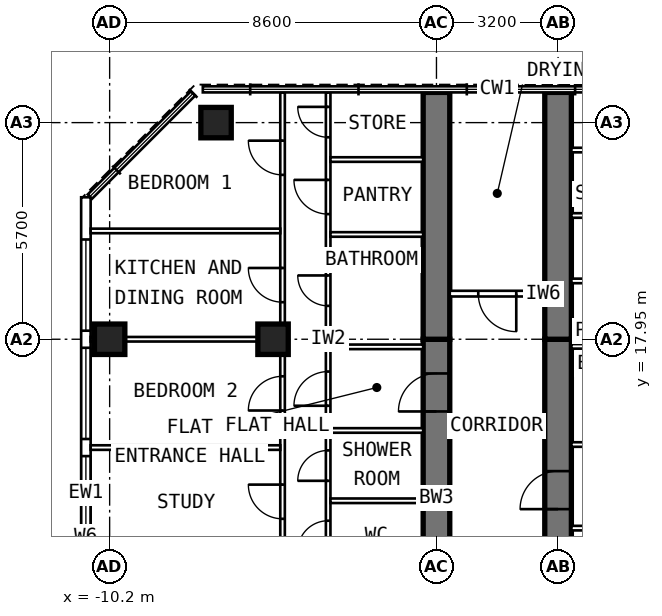
"""IFC4 building model, lengths in metres.
Left out: names, types, materials, properties, quantities, classifications, styles, units other than length and angle.
Written with IfcOpenShell. Run it as: python <this file> out.ifc"""

import sys

from ifc_helpers import new_model, si_unit, direction, frame, frame_2d, origin, origin_2d, place, context, subcontext, project, spatial, rectangle, extrude, element, fill, save


model = new_model("IFC4")
c1 = context("Model", 3, precision=1e-05, world=origin(), true_north=direction((0.0, 1.0)))
c2 = subcontext(c1, "Body", "Model", "MODEL_VIEW")
j1 = project(units=[si_unit("LENGTHUNIT", "METRE"), si_unit("PLANEANGLEUNIT", "RADIAN")], contexts=[c1])
p1 = place(None, origin())
s1 = spatial("IfcSite", under=j1, at=p1, CompositionType="ELEMENT")
p2 = place(p1, origin())
s2 = spatial("IfcBuilding", under=s1, at=p2, CompositionType="ELEMENT")
p3 = place(p2, frame((0.0, 0.0, 267.4)))
s3 = spatial("IfcBuildingStorey", under=s2, at=p3, CompositionType="ELEMENT", Elevation=267.4)
for number, where, z_axis, x_axis in (
    (1, (-10.2, 17.95, 0.0), (0.0, 0.0, 1.0), (0.0, 1.0, 0.0)),
    (2, (-7.4, 23.65, 0.0), (0.0, 0.0, 1.0), (0.0, 1.0, 0.0)),
    (3, (-5.9, 17.95, 0.0), (0.0, 0.0, 1.0), (0.0, 1.0, 0.0)),
):
    element("IfcColumn", number, at=place(p3, frame(where, z_axis=z_axis, x_axis=x_axis)), inside=s3, PredefinedType="COLUMN", context=c2, shape_type="SweptSolid", body=[
        extrude(rectangle(XDim=0.8, YDim=0.8, at=origin_2d()), origin(), (0.0, 0.0, 1.0), 3.6),
    ])
p4 = place(p3, frame((-1.6, 9.6, 0.0), z_axis=(0.0, 0.0, 1.0), x_axis=(0.0, 1.0, 0.0)))
e4 = element("IfcWall", 4, at=p4, inside=s3, PredefinedType="SHEAR", context=c2, shape_type="SweptSolid", body=[
    extrude(rectangle(XDim=8.35, YDim=0.7, at=frame_2d((4.175, 0.0))), origin(), (0.0, 0.0, 1.0), 3.6),
])
p5 = place(p4, frame((6.45, 0.0, 0.0)))
e5 = element("IfcOpeningElement", 5, at=p5, cuts=e4, PredefinedType="OPENING", context=c2, shape_type="SweptSolid", body=[
    extrude(rectangle(XDim=1.0, YDim=2.1, at=frame_2d((0.5, 1.05))), frame((0.0, 0.362, 0.0), z_axis=(0.0, -1.0, 0.0), x_axis=(1.0, 0.0, 0.0)), (0.0, 0.0, 1.0), 0.724),
])
p6 = place(p3, frame((-1.6, 17.95, 0.0), z_axis=(0.0, 0.0, 1.0), x_axis=(0.0, 1.0, 0.0)))
e6 = element("IfcWall", 6, at=p6, inside=s3, PredefinedType="SHEAR", context=c2, shape_type="SweptSolid", body=[
    extrude(rectangle(XDim=6.495, YDim=0.7, at=frame_2d((3.248, 0.0))), origin(), (0.0, 0.0, 1.0), 3.6),
])
p7 = place(p3, frame((1.6, 9.6, 0.0), z_axis=(0.0, 0.0, 1.0), x_axis=(0.0, 1.0, 0.0)))
e7 = element("IfcWall", 7, at=p7, inside=s3, PredefinedType="SHEAR", context=c2, shape_type="SweptSolid", body=[
    extrude(rectangle(XDim=8.35, YDim=0.7, at=frame_2d((4.175, 0.0))), origin(), (0.0, 0.0, 1.0), 3.6),
])
p8 = place(p7, frame((3.88, 0.0, 0.0)))
e8 = element("IfcOpeningElement", 8, at=p8, cuts=e7, PredefinedType="OPENING", context=c2, shape_type="SweptSolid", body=[
    extrude(rectangle(XDim=1.0, YDim=2.1, at=frame_2d((0.5, 1.05))), frame((0.0, 0.362, 0.0), z_axis=(0.0, -1.0, 0.0), x_axis=(1.0, 0.0, 0.0)), (0.0, 0.0, 1.0), 0.724),
])
p9 = place(p3, frame((1.6, 17.95, 0.0), z_axis=(0.0, 0.0, 1.0), x_axis=(0.0, 1.0, 0.0)))
e9 = element("IfcWall", 9, at=p9, inside=s3, PredefinedType="SHEAR", context=c2, shape_type="SweptSolid", body=[
    extrude(rectangle(XDim=6.495, YDim=0.7, at=frame_2d((3.248, 0.0))), origin(), (0.0, 0.0, 1.0), 3.6),
])
p10 = place(p3, frame((-10.825, 6.148, 0.0), z_axis=(0.0, 0.0, 1.0), x_axis=(0.0, 1.0, 0.0)))
e10 = element("IfcWall", 10, at=p10, inside=s3, PredefinedType="SOLIDWALL", context=c2, shape_type="SweptSolid", body=[
    extrude(rectangle(XDim=15.537, YDim=0.25, at=frame_2d((7.769, 0.0))), origin(), (0.0, 0.0, 1.0), 3.35),
])
p11 = place(p10, frame((0.627, 0.0, 0.6)))
e11 = element("IfcOpeningElement", 11, at=p11, cuts=e10, PredefinedType="OPENING", context=c2, shape_type="SweptSolid", body=[
    extrude(rectangle(XDim=2.4, YDim=2.0, at=frame_2d((1.2, 1.0))), frame((0.0, 0.137, 0.0), z_axis=(0.0, -1.0, 0.0), x_axis=(1.0, 0.0, 0.0)), (0.0, 0.0, 1.0), 0.274),
])
p12 = place(p10, frame((3.477, 0.0, 0.6)))
e12 = element("IfcOpeningElement", 12, at=p12, cuts=e10, PredefinedType="OPENING", context=c2, shape_type="SweptSolid", body=[
    extrude(rectangle(XDim=2.4, YDim=2.0, at=frame_2d((1.2, 1.0))), frame((0.0, 0.137, 0.0), z_axis=(0.0, -1.0, 0.0), x_axis=(1.0, 0.0, 0.0)), (0.0, 0.0, 1.0), 0.274),
])
p13 = place(p10, frame((6.327, 0.0, 0.6)))
e13 = element("IfcOpeningElement", 13, at=p13, cuts=e10, PredefinedType="OPENING", context=c2, shape_type="SweptSolid", body=[
    extrude(rectangle(XDim=2.4, YDim=2.0, at=frame_2d((1.2, 1.0))), frame((0.0, 0.137, 0.0), z_axis=(0.0, -1.0, 0.0), x_axis=(1.0, 0.0, 0.0)), (0.0, 0.0, 1.0), 0.274),
])
p14 = place(p10, frame((9.177, 0.0, 0.6)))
e14 = element("IfcOpeningElement", 14, at=p14, cuts=e10, PredefinedType="OPENING", context=c2, shape_type="SweptSolid", body=[
    extrude(rectangle(XDim=2.4, YDim=2.0, at=frame_2d((1.2, 1.0))), frame((0.0, 0.137, 0.0), z_axis=(0.0, -1.0, 0.0), x_axis=(1.0, 0.0, 0.0)), (0.0, 0.0, 1.0), 0.274),
])
p15 = place(p10, frame((12.027, 0.0, 0.6)))
e15 = element("IfcOpeningElement", 15, at=p15, cuts=e10, PredefinedType="OPENING", context=c2, shape_type="SweptSolid", body=[
    extrude(rectangle(XDim=2.4, YDim=2.0, at=frame_2d((1.2, 1.0))), frame((0.0, 0.137, 0.0), z_axis=(0.0, -1.0, 0.0), x_axis=(1.0, 0.0, 0.0)), (0.0, 0.0, 1.0), 0.274),
])
p16 = place(p3, frame((-4.45, 9.875, 0.0), z_axis=(0.0, 0.0, 1.0), x_axis=(0.0, 1.0, 0.0)))
e16 = element("IfcWall", 16, at=p16, inside=s3, PredefinedType="PARTITIONING", context=c2, shape_type="SweptSolid", body=[
    extrude(rectangle(XDim=14.57, YDim=0.12, at=frame_2d((7.285, 0.0))), origin(), (0.0, 0.0, 1.0), 3.35),
])
p17 = place(p16, frame((0.6, 0.0, 0.0)))
e17 = element("IfcOpeningElement", 17, at=p17, cuts=e16, PredefinedType="OPENING", context=c2, shape_type="SweptSolid", body=[
    extrude(rectangle(XDim=0.9, YDim=2.1, at=frame_2d((0.45, 1.05))), frame((0.0, 0.072, 0.0), z_axis=(0.0, -1.0, 0.0), x_axis=(1.0, 0.0, 0.0)), (0.0, 0.0, 1.0), 0.144),
])
p18 = place(p16, frame((2.5, 0.0, 0.0)))
e18 = element("IfcOpeningElement", 18, at=p18, cuts=e16, PredefinedType="OPENING", context=c2, shape_type="SweptSolid", body=[
    extrude(rectangle(XDim=0.8, YDim=2.1, at=frame_2d((0.4, 1.05))), frame((0.0, 0.072, 0.0), z_axis=(0.0, -1.0, 0.0), x_axis=(1.0, 0.0, 0.0)), (0.0, 0.0, 1.0), 0.144),
])
p19 = place(p16, frame((4.35, 0.0, 0.0)))
e19 = element("IfcOpeningElement", 19, at=p19, cuts=e16, PredefinedType="OPENING", context=c2, shape_type="SweptSolid", body=[
    extrude(rectangle(XDim=0.8, YDim=2.1, at=frame_2d((0.4, 1.05))), frame((0.0, 0.072, 0.0), z_axis=(0.0, -1.0, 0.0), x_axis=(1.0, 0.0, 0.0)), (0.0, 0.0, 1.0), 0.144),
])
p20 = place(p16, frame((6.325, 0.0, 0.0)))
e20 = element("IfcOpeningElement", 20, at=p20, cuts=e16, PredefinedType="OPENING", context=c2, shape_type="SweptSolid", body=[
    extrude(rectangle(XDim=0.9, YDim=2.1, at=frame_2d((0.45, 1.05))), frame((0.0, 0.072, 0.0), z_axis=(0.0, -1.0, 0.0), x_axis=(1.0, 0.0, 0.0)), (0.0, 0.0, 1.0), 0.144),
])
p21 = place(p16, frame((8.954, 0.0, 0.0)))
e21 = element("IfcOpeningElement", 21, at=p21, cuts=e16, PredefinedType="OPENING", context=c2, shape_type="SweptSolid", body=[
    extrude(rectangle(XDim=0.8, YDim=2.1, at=frame_2d((0.4, 1.05))), frame((0.0, 0.072, 0.0), z_axis=(0.0, -1.0, 0.0), x_axis=(1.0, 0.0, 0.0)), (0.0, 0.0, 1.0), 0.144),
])
p22 = place(p16, frame((11.368, 0.0, 0.0)))
e22 = element("IfcOpeningElement", 22, at=p22, cuts=e16, PredefinedType="OPENING", context=c2, shape_type="SweptSolid", body=[
    extrude(rectangle(XDim=0.9, YDim=2.1, at=frame_2d((0.45, 1.05))), frame((0.0, 0.072, 0.0), z_axis=(0.0, -1.0, 0.0), x_axis=(1.0, 0.0, 0.0)), (0.0, 0.0, 1.0), 0.144),
])
p23 = place(p16, frame((13.389, 0.0, 0.0)))
e23 = element("IfcOpeningElement", 23, at=p23, cuts=e16, PredefinedType="OPENING", context=c2, shape_type="SweptSolid", body=[
    extrude(rectangle(XDim=0.8, YDim=2.1, at=frame_2d((0.4, 1.05))), frame((0.0, 0.072, 0.0), z_axis=(0.0, -1.0, 0.0), x_axis=(1.0, 0.0, 0.0)), (0.0, 0.0, 1.0), 0.144),
])
p24 = place(p3, frame((-5.65, 9.6, 0.0), z_axis=(0.0, 0.0, 1.0), x_axis=(0.0, 1.0, 0.0)))
e24 = element("IfcWall", 24, at=p24, inside=s3, PredefinedType="PARTITIONING", context=c2, shape_type="SweptSolid", body=[
    extrude(rectangle(XDim=14.845, YDim=0.12, at=frame_2d((7.422, 0.0))), origin(), (0.0, 0.0, 1.0), 3.35),
])
p25 = place(p24, frame((1.075, 0.0, 0.0)))
e25 = element("IfcOpeningElement", 25, at=p25, cuts=e24, PredefinedType="OPENING", context=c2, shape_type="SweptSolid", body=[
    extrude(rectangle(XDim=0.9, YDim=2.1, at=frame_2d((0.45, 1.05))), frame((0.0, 0.072, 0.0), z_axis=(0.0, -1.0, 0.0), x_axis=(1.0, 0.0, 0.0)), (0.0, 0.0, 1.0), 0.144),
])
p26 = place(p24, frame((3.625, 0.0, 0.0)))
e26 = element("IfcOpeningElement", 26, at=p26, cuts=e24, PredefinedType="OPENING", context=c2, shape_type="SweptSolid", body=[
    extrude(rectangle(XDim=0.9, YDim=2.1, at=frame_2d((0.45, 1.05))), frame((0.0, 0.072, 0.0), z_axis=(0.0, -1.0, 0.0), x_axis=(1.0, 0.0, 0.0)), (0.0, 0.0, 1.0), 0.144),
])
p27 = place(p24, frame((6.475, 0.0, 0.0)))
e27 = element("IfcOpeningElement", 27, at=p27, cuts=e24, PredefinedType="OPENING", context=c2, shape_type="SweptSolid", body=[
    extrude(rectangle(XDim=0.9, YDim=2.1, at=frame_2d((0.45, 1.05))), frame((0.0, 0.072, 0.0), z_axis=(0.0, -1.0, 0.0), x_axis=(1.0, 0.0, 0.0)), (0.0, 0.0, 1.0), 0.144),
])
p28 = place(p24, frame((9.325, 0.0, 0.0)))
e28 = element("IfcOpeningElement", 28, at=p28, cuts=e24, PredefinedType="OPENING", context=c2, shape_type="SweptSolid", body=[
    extrude(rectangle(XDim=0.9, YDim=2.1, at=frame_2d((0.45, 1.05))), frame((0.0, 0.072, 0.0), z_axis=(0.0, -1.0, 0.0), x_axis=(1.0, 0.0, 0.0)), (0.0, 0.0, 1.0), 0.144),
])
p29 = place(p24, frame((12.675, 0.0, 0.0)))
e29 = element("IfcOpeningElement", 29, at=p29, cuts=e24, PredefinedType="OPENING", context=c2, shape_type="SweptSolid", body=[
    extrude(rectangle(XDim=0.9, YDim=2.1, at=frame_2d((0.45, 1.05))), frame((0.0, 0.072, 0.0), z_axis=(0.0, -1.0, 0.0), x_axis=(1.0, 0.0, 0.0)), (0.0, 0.0, 1.0), 0.144),
])
p30 = place(p3, frame((-5.71, 15.1, 0.0), z_axis=(0.0, 0.0, 1.0), x_axis=(-1.0, 0.0, 0.0)))
e30 = element("IfcWall", 30, at=p30, inside=s3, PredefinedType="PARTITIONING", context=c2, shape_type="SweptSolid", body=[
    extrude(rectangle(XDim=4.99, YDim=0.12, at=frame_2d((2.495, 0.0))), origin(), (0.0, 0.0, 1.0), 3.35),
])
p31 = place(p3, frame((-5.71, 17.95, 0.0), z_axis=(0.0, 0.0, 1.0), x_axis=(-1.0, 0.0, 0.0)))
e31 = element("IfcWall", 31, at=p31, inside=s3, PredefinedType="PARTITIONING", context=c2, shape_type="SweptSolid", body=[
    extrude(rectangle(XDim=4.99, YDim=0.12, at=frame_2d((2.495, 0.0))), origin(), (0.0, 0.0, 1.0), 2.45),
])
p32 = place(p3, frame((-5.71, 20.8, 0.0), z_axis=(0.0, 0.0, 1.0), x_axis=(-1.0, 0.0, 0.0)))
e32 = element("IfcWall", 32, at=p32, inside=s3, PredefinedType="PARTITIONING", context=c2, shape_type="SweptSolid", body=[
    extrude(rectangle(XDim=4.99, YDim=0.12, at=frame_2d((2.495, 0.0))), origin(), (0.0, 0.0, 1.0), 3.35),
])
for number, where, z_axis, x_axis in (
    (33, (-1.95, 13.7, 0.0), (0.0, 0.0, 1.0), (-1.0, 0.0, 0.0)),
    (34, (-1.95, 15.55, 0.0), (0.0, 0.0, 1.0), (-1.0, 0.0, 0.0)),
):
    element("IfcWall", number, at=place(p3, frame(where, z_axis=z_axis, x_axis=x_axis)), inside=s3, PredefinedType="PARTITIONING", context=c2, shape_type="SweptSolid", body=[
        extrude(rectangle(XDim=2.44, YDim=0.12, at=frame_2d((1.22, 0.0))), origin(), (0.0, 0.0, 1.0), 3.35),
    ])
p33 = place(p3, frame((-1.95, 17.75, 0.0), z_axis=(0.0, 0.0, 1.0), x_axis=(-1.0, 0.0, 0.0)))
e35 = element("IfcWall", 35, at=p33, inside=s3, PredefinedType="PARTITIONING", context=c2, shape_type="SweptSolid", body=[
    extrude(rectangle(XDim=2.44, YDim=0.12, at=frame_2d((1.22, 0.0))), origin(), (0.0, 0.0, 1.0), 2.45),
])
for number, where, z_axis, x_axis in (
    (36, (-1.95, 20.707, 0.0), (0.0, 0.0, 1.0), (-1.0, 0.0, 0.0)),
    (37, (-1.95, 22.678, 0.0), (0.0, 0.0, 1.0), (-1.0, 0.0, 0.0)),
    (38, (1.95, 12.98, 0.0), (0.0, 0.0, 1.0), (1.0, 0.0, 0.0)),
    (39, (1.95, 15.18, 0.0), (0.0, 0.0, 1.0), (1.0, 0.0, 0.0)),
):
    element("IfcWall", number, at=place(p3, frame(where, z_axis=z_axis, x_axis=x_axis)), inside=s3, PredefinedType="PARTITIONING", context=c2, shape_type="SweptSolid", body=[
        extrude(rectangle(XDim=2.44, YDim=0.12, at=frame_2d((1.22, 0.0))), origin(), (0.0, 0.0, 1.0), 3.35),
    ])
p34 = place(p3, frame((1.95, 17.763, 0.0), z_axis=(0.0, 0.0, 1.0), x_axis=(1.0, 0.0, 0.0)))
e40 = element("IfcWall", 40, at=p34, inside=s3, PredefinedType="PARTITIONING", context=c2, shape_type="SweptSolid", body=[
    extrude(rectangle(XDim=2.44, YDim=0.12, at=frame_2d((1.22, 0.0))), origin(), (0.0, 0.0, 1.0), 2.45),
])
for number, where, z_axis, x_axis in (
    (41, (1.95, 19.485, 0.0), (0.0, 0.0, 1.0), (1.0, 0.0, 0.0)),
    (42, (1.95, 21.206, 0.0), (0.0, 0.0, 1.0), (1.0, 0.0, 0.0)),
    (43, (1.95, 22.928, 0.0), (0.0, 0.0, 1.0), (1.0, 0.0, 0.0)),
):
    element("IfcWall", number, at=place(p3, frame(where, z_axis=z_axis, x_axis=x_axis)), inside=s3, PredefinedType="PARTITIONING", context=c2, shape_type="SweptSolid", body=[
        extrude(rectangle(XDim=2.44, YDim=0.12, at=frame_2d((1.22, 0.0))), origin(), (0.0, 0.0, 1.0), 3.35),
    ])
p35 = place(p3, frame((1.25, 19.15, 0.0), z_axis=(0.0, 0.0, 1.0), x_axis=(-1.0, 0.0, 0.0)))
e44 = element("IfcWall", 44, at=p35, inside=s3, PredefinedType="PARTITIONING", context=c2, shape_type="SweptSolid", body=[
    extrude(rectangle(XDim=2.5, YDim=0.15, at=frame_2d((1.25, 0.0))), origin(), (0.0, 0.0, 1.0), 3.35),
])
p36 = place(p35, frame((0.75, 0.0, 0.0)))
e45 = element("IfcOpeningElement", 45, at=p36, cuts=e44, PredefinedType="OPENING", context=c2, shape_type="SweptSolid", body=[
    extrude(rectangle(XDim=1.0, YDim=2.1, at=frame_2d((0.5, 1.05))), frame((0.0, 0.087, 0.0), z_axis=(0.0, -1.0, 0.0), x_axis=(1.0, 0.0, 0.0)), (0.0, 0.0, 1.0), 0.174),
])
p37 = place(p13, origin())
e46 = element("IfcWindow", 46, at=p37, inside=s3, PartitioningType="SINGLE_PANEL", PredefinedType="WINDOW", context=c2, shape_type="SweptSolid", body=[
    extrude(rectangle(XDim=2.4, YDim=2.0, at=frame_2d((1.2, 1.0))), frame((0.0, 0.03, 0.0), z_axis=(0.0, -1.0, 0.0), x_axis=(1.0, 0.0, 0.0)), (0.0, 0.0, 1.0), 0.06),
])
fill(e13, e46)
p38 = place(p14, origin())
e47 = element("IfcWindow", 47, at=p38, inside=s3, PartitioningType="SINGLE_PANEL", PredefinedType="WINDOW", context=c2, shape_type="SweptSolid", body=[
    extrude(rectangle(XDim=2.4, YDim=2.0, at=frame_2d((1.2, 1.0))), frame((0.0, 0.03, 0.0), z_axis=(0.0, -1.0, 0.0), x_axis=(1.0, 0.0, 0.0)), (0.0, 0.0, 1.0), 0.06),
])
fill(e14, e47)
p39 = place(p15, origin())
e48 = element("IfcWindow", 48, at=p39, inside=s3, PartitioningType="SINGLE_PANEL", PredefinedType="WINDOW", context=c2, shape_type="SweptSolid", body=[
    extrude(rectangle(XDim=2.4, YDim=2.0, at=frame_2d((1.2, 1.0))), frame((0.0, 0.03, 0.0), z_axis=(0.0, -1.0, 0.0), x_axis=(1.0, 0.0, 0.0)), (0.0, 0.0, 1.0), 0.06),
])
fill(e15, e48)
p40 = place(p5, origin())
e49 = element("IfcDoor", 49, at=p40, inside=s3, OperationType="SINGLE_SWING_LEFT", PredefinedType="DOOR", context=c2, shape_type="SweptSolid", body=[
    extrude(rectangle(XDim=1.0, YDim=2.1, at=frame_2d((0.5, 1.05))), frame((0.0, 0.1, 0.0), z_axis=(0.0, -1.0, 0.0), x_axis=(1.0, 0.0, 0.0)), (0.0, 0.0, 1.0), 0.2),
])
fill(e5, e49)
p41 = place(p26, origin())
e50 = element("IfcDoor", 50, at=p41, inside=s3, OperationType="SINGLE_SWING_RIGHT", PredefinedType="DOOR", context=c2, shape_type="SweptSolid", body=[
    extrude(rectangle(XDim=0.9, YDim=2.1, at=frame_2d((0.45, 1.05))), frame((0.0, 0.025, 0.0), z_axis=(0.0, -1.0, 0.0), x_axis=(1.0, 0.0, 0.0)), (0.0, 0.0, 1.0), 0.05),
])
fill(e26, e50)
p42 = place(p27, origin())
e51 = element("IfcDoor", 51, at=p42, inside=s3, OperationType="SINGLE_SWING_LEFT", PredefinedType="DOOR", context=c2, shape_type="SweptSolid", body=[
    extrude(rectangle(XDim=0.9, YDim=2.1, at=frame_2d((0.45, 1.05))), frame((0.0, 0.025, 0.0), z_axis=(0.0, -1.0, 0.0), x_axis=(1.0, 0.0, 0.0)), (0.0, 0.0, 1.0), 0.05),
])
fill(e27, e51)
p43 = place(p28, origin())
e52 = element("IfcDoor", 52, at=p43, inside=s3, OperationType="SINGLE_SWING_RIGHT", PredefinedType="DOOR", context=c2, shape_type="SweptSolid", body=[
    extrude(rectangle(XDim=0.9, YDim=2.1, at=frame_2d((0.45, 1.05))), frame((0.0, 0.025, 0.0), z_axis=(0.0, -1.0, 0.0), x_axis=(1.0, 0.0, 0.0)), (0.0, 0.0, 1.0), 0.05),
])
fill(e28, e52)
p44 = place(p29, origin())
e53 = element("IfcDoor", 53, at=p44, inside=s3, OperationType="SINGLE_SWING_RIGHT", PredefinedType="DOOR", context=c2, shape_type="SweptSolid", body=[
    extrude(rectangle(XDim=0.9, YDim=2.1, at=frame_2d((0.45, 1.05))), frame((0.0, 0.025, 0.0), z_axis=(0.0, -1.0, 0.0), x_axis=(1.0, 0.0, 0.0)), (0.0, 0.0, 1.0), 0.05),
])
fill(e29, e53)
p45 = place(p18, origin())
e54 = element("IfcDoor", 54, at=p45, inside=s3, OperationType="SINGLE_SWING_LEFT", PredefinedType="DOOR", context=c2, shape_type="SweptSolid", body=[
    extrude(rectangle(XDim=0.8, YDim=2.1, at=frame_2d((0.4, 1.05))), frame((0.0, 0.025, 0.0), z_axis=(0.0, -1.0, 0.0), x_axis=(1.0, 0.0, 0.0)), (0.0, 0.0, 1.0), 0.05),
])
fill(e18, e54)
p46 = place(p19, origin())
e55 = element("IfcDoor", 55, at=p46, inside=s3, OperationType="SINGLE_SWING_LEFT", PredefinedType="DOOR", context=c2, shape_type="SweptSolid", body=[
    extrude(rectangle(XDim=0.8, YDim=2.1, at=frame_2d((0.4, 1.05))), frame((0.0, 0.025, 0.0), z_axis=(0.0, -1.0, 0.0), x_axis=(1.0, 0.0, 0.0)), (0.0, 0.0, 1.0), 0.05),
])
fill(e19, e55)
p47 = place(p20, origin())
e56 = element("IfcDoor", 56, at=p47, inside=s3, OperationType="SINGLE_SWING_LEFT", PredefinedType="DOOR", context=c2, shape_type="SweptSolid", body=[
    extrude(rectangle(XDim=0.9, YDim=2.1, at=frame_2d((0.45, 1.05))), frame((0.0, 0.025, 0.0), z_axis=(0.0, -1.0, 0.0), x_axis=(1.0, 0.0, 0.0)), (0.0, 0.0, 1.0), 0.05),
])
fill(e20, e56)
p48 = place(p21, origin())
e57 = element("IfcDoor", 57, at=p48, inside=s3, OperationType="SINGLE_SWING_RIGHT", PredefinedType="DOOR", context=c2, shape_type="SweptSolid", body=[
    extrude(rectangle(XDim=0.8, YDim=2.1, at=frame_2d((0.4, 1.05))), frame((0.0, 0.025, 0.0), z_axis=(0.0, -1.0, 0.0), x_axis=(1.0, 0.0, 0.0)), (0.0, 0.0, 1.0), 0.05),
])
fill(e21, e57)
p49 = place(p22, origin())
e58 = element("IfcDoor", 58, at=p49, inside=s3, OperationType="SINGLE_SWING_RIGHT", PredefinedType="DOOR", context=c2, shape_type="SweptSolid", body=[
    extrude(rectangle(XDim=0.9, YDim=2.1, at=frame_2d((0.45, 1.05))), frame((0.0, 0.025, 0.0), z_axis=(0.0, -1.0, 0.0), x_axis=(1.0, 0.0, 0.0)), (0.0, 0.0, 1.0), 0.05),
])
fill(e22, e58)
p50 = place(p23, origin())
e59 = element("IfcDoor", 59, at=p50, inside=s3, OperationType="SINGLE_SWING_RIGHT", PredefinedType="DOOR", context=c2, shape_type="SweptSolid", body=[
    extrude(rectangle(XDim=0.8, YDim=2.1, at=frame_2d((0.4, 1.05))), frame((0.0, 0.025, 0.0), z_axis=(0.0, -1.0, 0.0), x_axis=(1.0, 0.0, 0.0)), (0.0, 0.0, 1.0), 0.05),
])
fill(e23, e59)
p51 = place(p8, origin())
e60 = element("IfcDoor", 60, at=p51, inside=s3, OperationType="SINGLE_SWING_LEFT", PredefinedType="DOOR", context=c2, shape_type="SweptSolid", body=[
    extrude(rectangle(XDim=1.0, YDim=2.1, at=frame_2d((0.5, 1.05))), frame((0.0, 0.1, 0.0), z_axis=(0.0, -1.0, 0.0), x_axis=(1.0, 0.0, 0.0)), (0.0, 0.0, 1.0), 0.2),
])
fill(e8, e60)
p52 = place(p36, origin())
e61 = element("IfcDoor", 61, at=p52, inside=s3, OperationType="SINGLE_SWING_LEFT", PredefinedType="DOOR", context=c2, shape_type="SweptSolid", body=[
    extrude(rectangle(XDim=1.0, YDim=2.1, at=frame_2d((0.5, 1.05))), frame((0.0, 0.025, 0.0), z_axis=(0.0, -1.0, 0.0), x_axis=(1.0, 0.0, 0.0)), (0.0, 0.0, 1.0), 0.05),
])
fill(e45, e61)
save(model, sys.argv[1])
